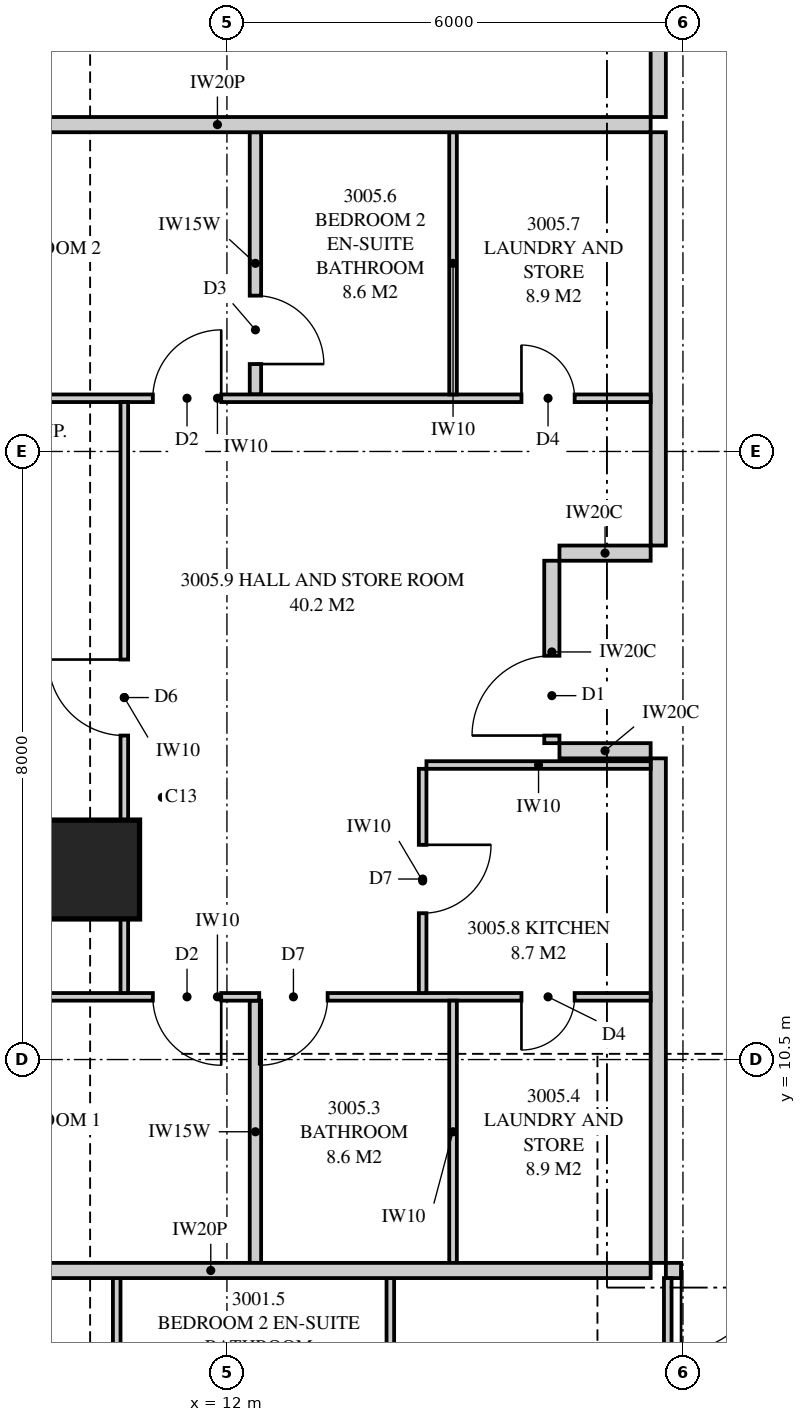
"""IFC4 building model, lengths in metres.
Left out: names, types, materials, properties, quantities, classifications, styles, units other than length and angle.
Written with IfcOpenShell. Run it as: python <this file> out.ifc"""

import sys

from ifc_helpers import new_model, si_unit, direction, frame, frame_2d, origin, origin_2d, place, context, subcontext, project, spatial, polyline, rectangle, outline, extrude, element, fill, save


model = new_model("IFC4")
c1 = context("Model", 3, precision=1e-05, world=origin(), true_north=direction((0.0, 1.0)))
c2 = subcontext(c1, "Body", "Model", "MODEL_VIEW")
j1 = project(units=[si_unit("LENGTHUNIT", "METRE"), si_unit("PLANEANGLEUNIT", "RADIAN")], contexts=[c1])
p1 = place(None, origin())
s1 = spatial("IfcSite", under=j1, at=p1, CompositionType="ELEMENT")
p2 = place(p1, origin())
s2 = spatial("IfcBuilding", under=s1, at=p2, CompositionType="ELEMENT")
p3 = place(p2, frame((0.0, 0.0, 111.55)))
s3 = spatial("IfcBuildingStorey", under=s2, at=p3, CompositionType="ELEMENT", Elevation=111.55)
p4 = place(p3, frame((10.2, 13.0, 0.0), z_axis=(0.0, 0.0, 1.0), x_axis=(1.0, 0.0, 0.0)))
e1 = element("IfcColumn", 1, at=p4, inside=s3, PredefinedType="COLUMN", context=c2, shape_type="SweptSolid", body=[
    extrude(rectangle(XDim=1.3, YDim=1.3, at=origin_2d()), origin(), (0.0, 0.0, 1.0), 3.35),
])
p5 = place(p3, frame((17.775, 7.725, 0.0), z_axis=(0.0, 0.0, 1.0), x_axis=(1.0, 0.0, 0.0)))
e2 = element("IfcWall", 2, at=p5, inside=s3, PredefinedType="PARTITIONING", context=c2, shape_type="SweptSolid", body=[
    extrude(rectangle(XDim=8.225, YDim=0.2, at=frame_2d((4.113, 0.0))), origin(), (0.0, 0.0, 1.0), 3.11),
])
p6 = place(p5, frame((0.2, 0.0, 0.0)))
e3 = element("IfcOpeningElement", 3, at=p6, cuts=e2, PredefinedType="OPENING", context=c2, shape_type="SweptSolid", body=[
    extrude(rectangle(XDim=1.05, YDim=2.2, at=frame_2d((0.525, 1.1))), frame((0.0, 0.11, 0.0), z_axis=(0.0, -1.0, 0.0), x_axis=(1.0, 0.0, 0.0)), (0.0, 0.0, 1.0), 0.22),
])
p7 = place(p3, frame((10.55, 2.76, 0.0), z_axis=(0.0, 0.0, 1.0), x_axis=(0.0, 1.0, 0.0)))
e4 = element("IfcWall", 4, at=p7, inside=s3, PredefinedType="PARTITIONING", context=c2, shape_type="SweptSolid", body=[
    extrude(outline(polyline([(0.0, 0.0), (4.865, 0.0), (4.865, 2.51), (0.358, 2.51), (0.358, 2.15), (0.0, 2.15), (0.0, 0.0)])), frame((0.0, 0.05, 0.0), z_axis=(0.0, -1.0, 0.0), x_axis=(1.0, 0.0, 0.0)), (0.0, 0.0, 1.0), 0.1),
])
p8 = place(p7, frame((2.834, 0.0, 0.0)))
e5 = element("IfcOpeningElement", 5, at=p8, cuts=e4, PredefinedType="OPENING", context=c2, shape_type="SweptSolid", body=[
    extrude(rectangle(XDim=0.9, YDim=2.1, at=frame_2d((0.45, 1.05))), frame((0.0, 0.06, 0.0), z_axis=(0.0, -1.0, 0.0), x_axis=(1.0, 0.0, 0.0)), (0.0, 0.0, 1.0), 0.12),
])
p9 = place(p3, frame((14.15, 0.175, 0.0), z_axis=(0.0, 0.0, 1.0), x_axis=(0.0, 1.0, 0.0)))
e6 = element("IfcWall", 6, at=p9, inside=s3, PredefinedType="PARTITIONING", context=c2, shape_type="SweptSolid", body=[
    extrude(outline(polyline([(0.0, 0.0), (7.45, 0.0), (7.45, 3.11), (2.208, 3.11), (2.208, 2.15), (0.453, 2.15), (0.453, 3.11), (0.0, 3.11), (0.0, 0.0)])), frame((0.0, 0.05, 0.0), z_axis=(0.0, -1.0, 0.0), x_axis=(1.0, 0.0, 0.0)), (0.0, 0.0, 1.0), 0.1),
])
p10 = place(p9, frame((3.6, 0.0, 0.0)))
e7 = element("IfcOpeningElement", 7, at=p10, cuts=e6, PredefinedType="OPENING", context=c2, shape_type="SweptSolid", body=[
    extrude(rectangle(XDim=0.9, YDim=2.1, at=frame_2d((0.45, 1.05))), frame((0.0, 0.06, 0.0), z_axis=(0.0, -1.0, 0.0), x_axis=(1.0, 0.0, 0.0)), (0.0, 0.0, 1.0), 0.12),
])
p11 = place(p3, frame((17.8, 4.675, 0.0), z_axis=(0.0, 0.0, 1.0), x_axis=(0.0, 1.0, 0.0)))
e8 = element("IfcWall", 8, at=p11, inside=s3, PredefinedType="PARTITIONING", context=c2, shape_type="SweptSolid", body=[
    extrude(rectangle(XDim=2.95, YDim=0.1, at=frame_2d((1.475, 0.0))), origin(), (0.0, 0.0, 1.0), 3.11),
])
p12 = place(p3, frame((6.0, 7.725, 0.0), z_axis=(0.0, 0.0, 1.0), x_axis=(1.0, 0.0, 0.0)))
e9 = element("IfcWall", 9, at=p12, inside=s3, PredefinedType="PARTITIONING", context=c2, shape_type="SweptSolid", body=[
    extrude(outline(polyline([(0.0, 0.0), (11.575, 0.0), (11.575, 3.11), (11.212, 3.11), (11.212, 2.541), (10.538, 2.541), (10.538, 3.11), (5.51, 3.11), (5.51, 2.51), (2.969, 2.51), (2.969, 2.541), (2.727, 2.541), (2.727, 2.15), (0.884, 2.15), (0.884, 3.11), (0.0, 3.11), (0.0, 0.0)])), frame((0.0, 0.1, 0.0), z_axis=(0.0, -1.0, 0.0), x_axis=(1.0, 0.0, 0.0)), (0.0, 0.0, 1.0), 0.2),
])
p13 = place(p3, frame((6.175, 22.8, 0.0), z_axis=(0.0, 0.0, 1.0), x_axis=(1.0, 0.0, 0.0)))
e10 = element("IfcWall", 10, at=p13, inside=s3, PredefinedType="PARTITIONING", context=c2, shape_type="SweptSolid", body=[
    extrude(outline(polyline([(0.0, 0.0), (11.4, 0.0), (11.4, 3.11), (5.335, 3.11), (5.335, 2.51), (2.715, 2.51), (2.715, 3.11), (1.685, 3.11), (1.685, 2.15), (0.0, 2.15), (0.0, 0.0)])), frame((0.0, 0.1, 0.0), z_axis=(0.0, -1.0, 0.0), x_axis=(1.0, 0.0, 0.0)), (0.0, 0.0, 1.0), 0.2),
])
p14 = place(p3, frame((17.675, 7.825, 0.0), z_axis=(0.0, 0.0, 1.0), x_axis=(0.0, 1.0, 0.0)))
e11 = element("IfcWall", 11, at=p14, inside=s3, PredefinedType="PARTITIONING", context=c2, shape_type="SweptSolid", body=[
    extrude(outline(polyline([(0.0, 0.0), (6.637, 0.0), (6.637, 3.11), (3.087, 3.11), (3.087, 2.541), (2.413, 2.541), (2.413, 3.11), (0.0, 3.11), (0.0, 0.0)])), frame((0.0, 0.1, 0.0), z_axis=(0.0, -1.0, 0.0), x_axis=(1.0, 0.0, 0.0)), (0.0, 0.0, 1.0), 0.2),
])
p15 = place(p3, frame((6.175, 11.325, 0.0), z_axis=(0.0, 0.0, 1.0), x_axis=(1.0, 0.0, 0.0)))
e12 = element("IfcWall", 12, at=p15, inside=s3, PredefinedType="PARTITIONING", context=c2, shape_type="SweptSolid", body=[
    extrude(outline(polyline([(0.175, 3.11), (0.0, 3.11), (0.0, 0.0), (0.529, 0.0), (0.529, 0.325), (1.021, 0.325), (1.021, 0.0), (11.4, 0.0), (11.4, 3.11), (5.285, 3.11), (5.285, 2.51), (2.765, 2.51), (2.765, 3.11), (2.744, 3.11), (2.744, 2.541), (2.169, 2.541), (2.169, 3.11), (1.918, 3.11), (1.918, 2.15), (1.021, 2.15), (1.021, 1.825), (0.529, 1.825), (0.529, 2.15), (0.175, 2.15), (0.175, 3.11)])), frame((0.0, 0.05, 0.0), z_axis=(0.0, -1.0, 0.0), x_axis=(1.0, 0.0, 0.0)), (0.0, 0.0, 1.0), 0.1),
])
p16 = place(p15, frame((4.85, 0.0, 0.0)))
e13 = element("IfcOpeningElement", 13, at=p16, cuts=e12, PredefinedType="OPENING", context=c2, shape_type="SweptSolid", body=[
    extrude(rectangle(XDim=0.9, YDim=2.1, at=frame_2d((0.45, 1.05))), frame((0.0, 0.06, 0.0), z_axis=(0.0, -1.0, 0.0), x_axis=(1.0, 0.0, 0.0)), (0.0, 0.0, 1.0), 0.12),
])
p17 = place(p15, frame((6.25, 0.0, 0.0)))
e14 = element("IfcOpeningElement", 14, at=p17, cuts=e12, PredefinedType="OPENING", context=c2, shape_type="SweptSolid", body=[
    extrude(rectangle(XDim=0.9, YDim=2.1, at=frame_2d((0.45, 1.05))), frame((0.0, 0.06, 0.0), z_axis=(0.0, -1.0, 0.0), x_axis=(1.0, 0.0, 0.0)), (0.0, 0.0, 1.0), 0.12),
])
p18 = place(p15, frame((9.7, 0.0, 0.0)))
e15 = element("IfcOpeningElement", 15, at=p18, cuts=e12, PredefinedType="OPENING", context=c2, shape_type="SweptSolid", body=[
    extrude(rectangle(XDim=0.7, YDim=2.1, at=frame_2d((0.35, 1.05))), frame((0.0, 0.06, 0.0), z_axis=(0.0, -1.0, 0.0), x_axis=(1.0, 0.0, 0.0)), (0.0, 0.0, 1.0), 0.12),
])
p19 = place(p3, frame((6.175, 19.2, 0.0), z_axis=(0.0, 0.0, 1.0), x_axis=(1.0, 0.0, 0.0)))
e16 = element("IfcWall", 16, at=p19, inside=s3, PredefinedType="PARTITIONING", context=c2, shape_type="SweptSolid", body=[
    extrude(outline(polyline([(0.0, 0.0), (11.4, 0.0), (11.4, 3.11), (5.285, 3.11), (5.285, 2.51), (2.765, 2.51), (2.765, 3.11), (1.635, 3.11), (1.635, 2.15), (0.0, 2.15), (0.0, 3.11), (0.0, 0.0)])), frame((0.0, 0.05, 0.0), z_axis=(0.0, -1.0, 0.0), x_axis=(1.0, 0.0, 0.0)), (0.0, 0.0, 1.0), 0.1),
])
p20 = place(p19, frame((4.85, 0.0, 0.0)))
e17 = element("IfcOpeningElement", 17, at=p20, cuts=e16, PredefinedType="OPENING", context=c2, shape_type="SweptSolid", body=[
    extrude(rectangle(XDim=0.9, YDim=2.1, at=frame_2d((0.45, 1.05))), frame((0.0, 0.06, 0.0), z_axis=(0.0, -1.0, 0.0), x_axis=(1.0, 0.0, 0.0)), (0.0, 0.0, 1.0), 0.12),
])
p21 = place(p19, frame((9.7, 0.0, 0.0)))
e18 = element("IfcOpeningElement", 18, at=p21, cuts=e16, PredefinedType="OPENING", context=c2, shape_type="SweptSolid", body=[
    extrude(rectangle(XDim=0.7, YDim=2.1, at=frame_2d((0.35, 1.05))), frame((0.0, 0.06, 0.0), z_axis=(0.0, -1.0, 0.0), x_axis=(1.0, 0.0, 0.0)), (0.0, 0.0, 1.0), 0.12),
])
p22 = place(p3, frame((12.375, 7.825, 0.0), z_axis=(0.0, 0.0, 1.0), x_axis=(0.0, 1.0, 0.0)))
e19 = element("IfcWall", 19, at=p22, inside=s3, PredefinedType="PLUMBINGWALL", context=c2, shape_type="SweptSolid", body=[
    extrude(outline(polyline([(0.0, 0.0), (3.45, 0.0), (3.45, 3.11), (3.062, 3.11), (3.062, 2.541), (2.438, 2.541), (2.438, 3.11), (0.0, 3.11), (0.0, 0.0)])), frame((0.0, 0.075, 0.0), z_axis=(0.0, -1.0, 0.0), x_axis=(1.0, 0.0, 0.0)), (0.0, 0.0, 1.0), 0.15),
])
p23 = place(p3, frame((14.975, 7.825, 0.0), z_axis=(0.0, 0.0, 1.0), x_axis=(0.0, 1.0, 0.0)))
e20 = element("IfcWall", 20, at=p23, inside=s3, PredefinedType="PARTITIONING", context=c2, shape_type="SweptSolid", body=[
    extrude(outline(polyline([(0.0, 0.0), (3.45, 0.0), (3.45, 3.11), (3.037, 3.11), (3.037, 2.541), (2.463, 2.541), (2.463, 3.11), (0.0, 3.11), (0.0, 0.0)])), frame((0.0, 0.05, 0.0), z_axis=(0.0, -1.0, 0.0), x_axis=(1.0, 0.0, 0.0)), (0.0, 0.0, 1.0), 0.1),
])
p24 = place(p3, frame((12.375, 19.25, 0.0), z_axis=(0.0, 0.0, 1.0), x_axis=(0.0, 1.0, 0.0)))
e21 = element("IfcWall", 21, at=p24, inside=s3, PredefinedType="PLUMBINGWALL", context=c2, shape_type="SweptSolid", body=[
    extrude(rectangle(XDim=3.45, YDim=0.15, at=frame_2d((1.725, 0.0))), origin(), (0.0, 0.0, 1.0), 3.11),
])
p25 = place(p24, frame((0.4, 0.0, 0.0)))
e22 = element("IfcOpeningElement", 22, at=p25, cuts=e21, PredefinedType="OPENING", context=c2, shape_type="SweptSolid", body=[
    extrude(rectangle(XDim=0.9, YDim=2.1, at=frame_2d((0.45, 1.05))), frame((0.0, 0.085, 0.0), z_axis=(0.0, -1.0, 0.0), x_axis=(1.0, 0.0, 0.0)), (0.0, 0.0, 1.0), 0.17),
])
p26 = place(p3, frame((14.975, 19.25, 0.0), z_axis=(0.0, 0.0, 1.0), x_axis=(0.0, 1.0, 0.0)))
e23 = element("IfcWall", 23, at=p26, inside=s3, PredefinedType="PARTITIONING", context=c2, shape_type="SweptSolid", body=[
    extrude(rectangle(XDim=3.45, YDim=0.1, at=frame_2d((1.725, 0.0))), origin(), (0.0, 0.0, 1.0), 3.11),
])
p27 = place(p3, frame((14.575, 11.375, 0.0), z_axis=(0.0, 0.0, 1.0), x_axis=(0.0, 1.0, 0.0)))
e24 = element("IfcWall", 24, at=p27, inside=s3, PredefinedType="PARTITIONING", context=c2, shape_type="SweptSolid", body=[
    extrude(rectangle(XDim=2.95, YDim=0.1, at=frame_2d((1.475, 0.0))), origin(), (0.0, 0.0, 1.0), 3.11),
])
p28 = place(p27, frame((1.05, 0.0, 0.0)))
e25 = element("IfcOpeningElement", 25, at=p28, cuts=e24, PredefinedType="OPENING", context=c2, shape_type="SweptSolid", body=[
    extrude(rectangle(XDim=0.9, YDim=2.1, at=frame_2d((0.45, 1.05))), frame((0.0, 0.06, 0.0), z_axis=(0.0, -1.0, 0.0), x_axis=(1.0, 0.0, 0.0)), (0.0, 0.0, 1.0), 0.12),
])
p29 = place(p3, frame((14.625, 14.375, 0.0), z_axis=(0.0, 0.0, 1.0), x_axis=(1.0, 0.0, 0.0)))
e26 = element("IfcWall", 26, at=p29, inside=s3, PredefinedType="PARTITIONING", context=c2, shape_type="SweptSolid", body=[
    extrude(rectangle(XDim=2.95, YDim=0.1, at=frame_2d((1.475, 0.0))), origin(), (0.0, 0.0, 1.0), 3.11),
])
p30 = place(p3, frame((10.65, 11.375, 0.0), z_axis=(0.0, 0.0, 1.0), x_axis=(0.0, 1.0, 0.0)))
e27 = element("IfcWall", 27, at=p30, inside=s3, PredefinedType="PARTITIONING", context=c2, shape_type="SweptSolid", body=[
    extrude(outline(polyline([(0.0, 0.0), (7.775, 0.0), (7.775, 3.11), (7.775, 2.51), (1.685, 2.51), (0.0, 2.51), (0.0, 3.11), (0.0, 0.0)])), frame((0.0, 0.05, 0.0), z_axis=(0.0, -1.0, 0.0), x_axis=(1.0, 0.0, 0.0)), (0.0, 0.0, 1.0), 0.1),
])
p31 = place(p30, frame((3.387, 0.0, 0.0)))
e28 = element("IfcOpeningElement", 28, at=p31, cuts=e27, PredefinedType="OPENING", context=c2, shape_type="SweptSolid", body=[
    extrude(rectangle(XDim=1.0, YDim=2.1, at=frame_2d((0.5, 1.05))), frame((0.0, 0.06, 0.0), z_axis=(0.0, -1.0, 0.0), x_axis=(1.0, 0.0, 0.0)), (0.0, 0.0, 1.0), 0.12),
])
p32 = place(p3, frame((17.675, 22.9, 0.0), z_axis=(0.0, 0.0, 1.0), x_axis=(0.0, 1.0, 0.0)))
e29 = element("IfcWall", 29, at=p32, inside=s3, PredefinedType="PARTITIONING", context=c2, shape_type="SweptSolid", body=[
    extrude(outline(polyline([(0.0, 0.0), (6.275, 0.0), (6.275, 3.11), (3.862, 3.11), (3.862, 2.541), (3.188, 2.541), (3.188, 3.11), (0.0, 3.11), (0.0, 0.0)])), frame((0.0, 0.1, 0.0), z_axis=(0.0, -1.0, 0.0), x_axis=(1.0, 0.0, 0.0)), (0.0, 0.0, 1.0), 0.2),
])
p33 = place(p32, frame((2.238, 0.0, 0.0)))
e30 = element("IfcOpeningElement", 30, at=p33, cuts=e29, PredefinedType="OPENING", context=c2, shape_type="SweptSolid", body=[
    extrude(rectangle(XDim=1.8, YDim=2.1, at=frame_2d((0.9, 1.05))), frame((0.0, 0.11, 0.0), z_axis=(0.0, -1.0, 0.0), x_axis=(1.0, 0.0, 0.0)), (0.0, 0.0, 1.0), 0.22),
])
p34 = place(p3, frame((17.675, 17.262, 0.0), z_axis=(0.0, 0.0, 1.0), x_axis=(0.0, 1.0, 0.0)))
e31 = element("IfcWall", 31, at=p34, inside=s3, PredefinedType="PARTITIONING", context=c2, shape_type="SweptSolid", body=[
    extrude(rectangle(XDim=5.438, YDim=0.2, at=frame_2d((2.719, 0.0))), origin(), (0.0, 0.0, 1.0), 3.11),
])
p35 = place(p3, frame((16.275, 14.663, 0.0), z_axis=(0.0, 0.0, 1.0), x_axis=(0.0, 1.0, 0.0)))
e32 = element("IfcWall", 32, at=p35, inside=s3, PredefinedType="PARTITIONING", context=c2, shape_type="SweptSolid", body=[
    extrude(rectangle(XDim=2.4, YDim=0.2, at=frame_2d((1.2, 0.0))), origin(), (0.0, 0.0, 1.0), 3.11),
])
p36 = place(p35, frame((0.1, 0.0, 0.0)))
e33 = element("IfcOpeningElement", 33, at=p36, cuts=e32, PredefinedType="OPENING", context=c2, shape_type="SweptSolid", body=[
    extrude(rectangle(XDim=1.05, YDim=2.2, at=frame_2d((0.525, 1.1))), frame((0.0, 0.11, 0.0), z_axis=(0.0, -1.0, 0.0), x_axis=(1.0, 0.0, 0.0)), (0.0, 0.0, 1.0), 0.22),
])
for number, where, z_axis, x_axis in (
    (34, (17.575, 14.562, 0.0), (0.0, 0.0, 1.0), (-1.0, 0.0, 0.0)),
    (35, (17.575, 17.163, 0.0), (0.0, 0.0, 1.0), (-1.0, 0.0, 0.0)),
):
    element("IfcWall", number, at=place(p3, frame(where, z_axis=z_axis, x_axis=x_axis)), inside=s3, PredefinedType="PARTITIONING", context=c2, shape_type="SweptSolid", body=[
        extrude(rectangle(XDim=1.2, YDim=0.2, at=frame_2d((0.6, 0.0))), origin(), (0.0, 0.0, 1.0), 3.11),
    ])
p37 = place(p6, frame((1.05, 0.0, 0.0), z_axis=(0.0, 0.0, 1.0), x_axis=(-1.0, 0.0, 0.0)))
e36 = element("IfcDoor", 36, at=p37, inside=s3, OperationType="SINGLE_SWING_RIGHT", PredefinedType="DOOR", context=c2, shape_type="SweptSolid", body=[
    extrude(rectangle(XDim=1.05, YDim=2.2, at=frame_2d((0.525, 1.1))), frame((0.0, 0.025, 0.0), z_axis=(0.0, -1.0, 0.0), x_axis=(1.0, 0.0, 0.0)), (0.0, 0.0, 1.0), 0.05),
])
fill(e3, e36)
p38 = place(p36, origin())
e37 = element("IfcDoor", 37, at=p38, inside=s3, OperationType="SINGLE_SWING_LEFT", PredefinedType="DOOR", context=c2, shape_type="SweptSolid", body=[
    extrude(rectangle(XDim=1.05, YDim=2.2, at=frame_2d((0.525, 1.1))), frame((0.0, 0.025, 0.0), z_axis=(0.0, -1.0, 0.0), x_axis=(1.0, 0.0, 0.0)), (0.0, 0.0, 1.0), 0.05),
])
fill(e33, e37)
p39 = place(p16, frame((0.9, 0.0, 0.0), z_axis=(0.0, 0.0, 1.0), x_axis=(-1.0, 0.0, 0.0)))
e38 = element("IfcDoor", 38, at=p39, inside=s3, OperationType="SINGLE_SWING_LEFT", PredefinedType="DOOR", context=c2, shape_type="SweptSolid", body=[
    extrude(rectangle(XDim=0.9, YDim=2.1, at=frame_2d((0.45, 1.05))), frame((0.0, 0.025, 0.0), z_axis=(0.0, -1.0, 0.0), x_axis=(1.0, 0.0, 0.0)), (0.0, 0.0, 1.0), 0.05),
])
fill(e13, e38)
p40 = place(p17, frame((0.9, 0.0, 0.0), z_axis=(0.0, 0.0, 1.0), x_axis=(-1.0, 0.0, 0.0)))
e39 = element("IfcDoor", 39, at=p40, inside=s3, OperationType="SINGLE_SWING_RIGHT", PredefinedType="DOOR", context=c2, shape_type="SweptSolid", body=[
    extrude(rectangle(XDim=0.9, YDim=2.1, at=frame_2d((0.45, 1.05))), frame((0.0, 0.025, 0.0), z_axis=(0.0, -1.0, 0.0), x_axis=(1.0, 0.0, 0.0)), (0.0, 0.0, 1.0), 0.05),
])
fill(e14, e39)
p41 = place(p18, frame((0.7, 0.0, 0.0), z_axis=(0.0, 0.0, 1.0), x_axis=(-1.0, 0.0, 0.0)))
e40 = element("IfcDoor", 40, at=p41, inside=s3, OperationType="SINGLE_SWING_RIGHT", PredefinedType="DOOR", context=c2, shape_type="SweptSolid", body=[
    extrude(rectangle(XDim=0.7, YDim=2.1, at=frame_2d((0.35, 1.05))), frame((0.0, 0.025, 0.0), z_axis=(0.0, -1.0, 0.0), x_axis=(1.0, 0.0, 0.0)), (0.0, 0.0, 1.0), 0.05),
])
fill(e15, e40)
p42 = place(p20, origin())
e41 = element("IfcDoor", 41, at=p42, inside=s3, OperationType="SINGLE_SWING_RIGHT", PredefinedType="DOOR", context=c2, shape_type="SweptSolid", body=[
    extrude(rectangle(XDim=0.9, YDim=2.1, at=frame_2d((0.45, 1.05))), frame((0.0, 0.025, 0.0), z_axis=(0.0, -1.0, 0.0), x_axis=(1.0, 0.0, 0.0)), (0.0, 0.0, 1.0), 0.05),
])
fill(e17, e41)
p43 = place(p25, frame((0.9, 0.0, 0.0), z_axis=(0.0, 0.0, 1.0), x_axis=(-1.0, 0.0, 0.0)))
e42 = element("IfcDoor", 42, at=p43, inside=s3, OperationType="SINGLE_SWING_RIGHT", PredefinedType="DOOR", context=c2, shape_type="SweptSolid", body=[
    extrude(rectangle(XDim=0.9, YDim=2.1, at=frame_2d((0.45, 1.05))), frame((0.0, 0.025, 0.0), z_axis=(0.0, -1.0, 0.0), x_axis=(1.0, 0.0, 0.0)), (0.0, 0.0, 1.0), 0.05),
])
fill(e22, e42)
p44 = place(p21, origin())
e43 = element("IfcDoor", 43, at=p44, inside=s3, OperationType="SINGLE_SWING_LEFT", PredefinedType="DOOR", context=c2, shape_type="SweptSolid", body=[
    extrude(rectangle(XDim=0.7, YDim=2.1, at=frame_2d((0.35, 1.05))), frame((0.0, 0.025, 0.0), z_axis=(0.0, -1.0, 0.0), x_axis=(1.0, 0.0, 0.0)), (0.0, 0.0, 1.0), 0.05),
])
fill(e18, e43)
p45 = place(p28, frame((0.9, 0.0, 0.0), z_axis=(0.0, 0.0, 1.0), x_axis=(-1.0, 0.0, 0.0)))
e44 = element("IfcDoor", 44, at=p45, inside=s3, OperationType="SINGLE_SWING_LEFT", PredefinedType="DOOR", context=c2, shape_type="SweptSolid", body=[
    extrude(rectangle(XDim=0.9, YDim=2.1, at=frame_2d((0.45, 1.05))), frame((0.0, 0.025, 0.0), z_axis=(0.0, -1.0, 0.0), x_axis=(1.0, 0.0, 0.0)), (0.0, 0.0, 1.0), 0.05),
])
fill(e25, e44)
p46 = place(p31, origin())
e45 = element("IfcDoor", 45, at=p46, inside=s3, OperationType="SINGLE_SWING_RIGHT", PredefinedType="DOOR", context=c2, shape_type="SweptSolid", body=[
    extrude(rectangle(XDim=1.0, YDim=2.1, at=frame_2d((0.5, 1.05))), frame((0.0, 0.025, 0.0), z_axis=(0.0, -1.0, 0.0), x_axis=(1.0, 0.0, 0.0)), (0.0, 0.0, 1.0), 0.05),
])
fill(e28, e45)
save(model, sys.argv[1])
